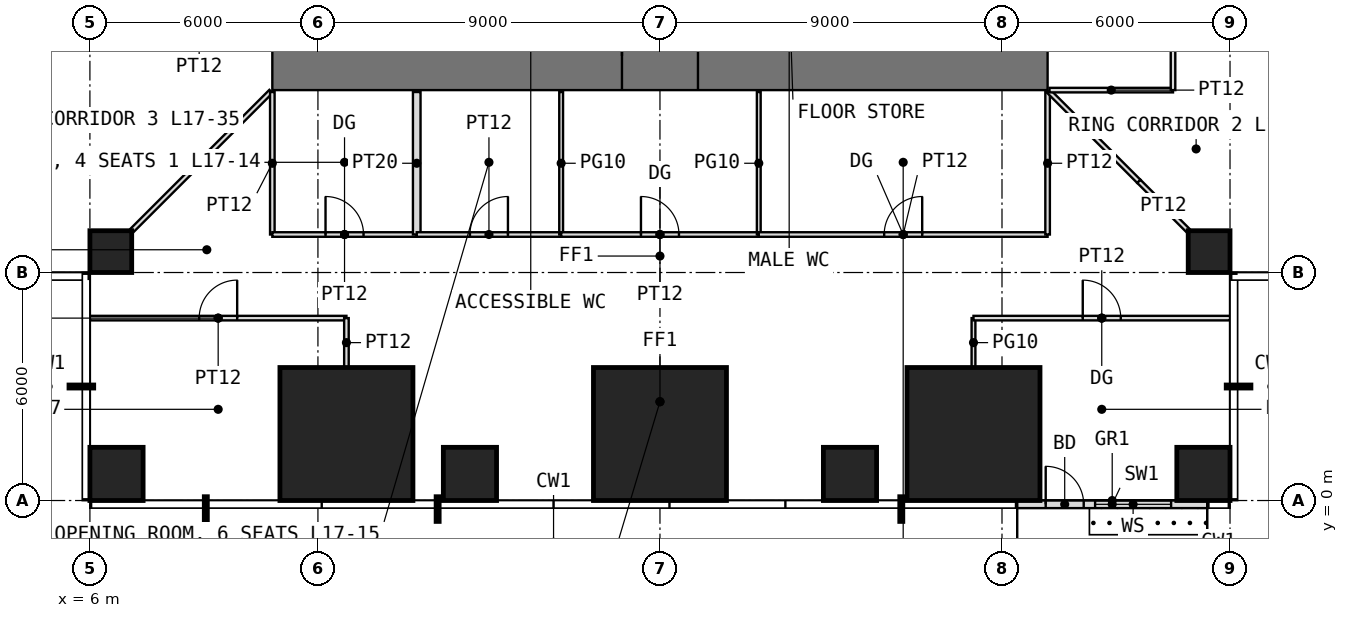
"""IFC4 building model, lengths in metres.
Left out: names, types, materials, properties, quantities, classifications, styles, units other than length and angle.
Written with IfcOpenShell. Run it as: python <this file> out.ifc"""

import sys

from ifc_helpers import new_model, si_unit, direction, frame, frame_2d, origin, origin_2d, place, context, subcontext, project, spatial, rectangle, extrude, element, fill, save


model = new_model("IFC4")
c1 = context("Model", 3, precision=1e-05, world=origin(), true_north=direction((0.0, 1.0)))
c2 = subcontext(c1, "Body", "Model", "MODEL_VIEW")
j1 = project(units=[si_unit("LENGTHUNIT", "METRE"), si_unit("PLANEANGLEUNIT", "RADIAN")], contexts=[c1])
p1 = place(None, origin())
s1 = spatial("IfcSite", under=j1, at=p1, CompositionType="ELEMENT")
p2 = place(p1, origin())
s2 = spatial("IfcBuilding", under=s1, at=p2, CompositionType="ELEMENT")
p3 = place(p2, frame((0.0, 0.0, 74.5)))
s3 = spatial("IfcBuildingStorey", under=s2, at=p3, CompositionType="ELEMENT", Elevation=74.5)
p4 = place(p3, frame((6.7, 0.7, 0.0), z_axis=(0.0, 0.0, 1.0), x_axis=(1.0, 0.0, 0.0)))
e1 = element("IfcColumn", 1, at=p4, inside=s3, PredefinedType="COLUMN", context=c2, shape_type="SweptSolid", body=[
    extrude(rectangle(XDim=1.4, YDim=1.4, at=origin_2d()), origin(), (0.0, 0.0, 1.0), 4.0),
])
p5 = place(p3, frame((12.75, 1.75, 0.0), z_axis=(0.0, 0.0, 1.0), x_axis=(1.0, 0.0, 0.0)))
e2 = element("IfcColumn", 2, at=p5, inside=s3, PredefinedType="COLUMN", context=c2, shape_type="SweptSolid", body=[
    extrude(rectangle(XDim=3.5, YDim=3.5, at=origin_2d()), origin(), (0.0, 0.0, 1.0), 4.0),
])
p6 = place(p3, frame((16.0, 0.7, 0.0), z_axis=(0.0, 0.0, 1.0), x_axis=(1.0, 0.0, 0.0)))
e3 = element("IfcColumn", 3, at=p6, inside=s3, PredefinedType="COLUMN", context=c2, shape_type="SweptSolid", body=[
    extrude(rectangle(XDim=1.4, YDim=1.4, at=origin_2d()), origin(), (0.0, 0.0, 1.0), 4.0),
])
p7 = place(p3, frame((21.0, 1.75, 0.0), z_axis=(0.0, 0.0, 1.0), x_axis=(1.0, 0.0, 0.0)))
e4 = element("IfcColumn", 4, at=p7, inside=s3, PredefinedType="COLUMN", context=c2, shape_type="SweptSolid", body=[
    extrude(rectangle(XDim=3.5, YDim=3.5, at=origin_2d()), origin(), (0.0, 0.0, 1.0), 4.0),
])
p8 = place(p3, frame((26.0, 0.7, 0.0), z_axis=(0.0, 0.0, 1.0), x_axis=(1.0, 0.0, 0.0)))
e5 = element("IfcColumn", 5, at=p8, inside=s3, PredefinedType="COLUMN", context=c2, shape_type="SweptSolid", body=[
    extrude(rectangle(XDim=1.4, YDim=1.4, at=origin_2d()), origin(), (0.0, 0.0, 1.0), 4.0),
])
p9 = place(p3, frame((29.25, 1.75, 0.0), z_axis=(0.0, 0.0, 1.0), x_axis=(1.0, 0.0, 0.0)))
e6 = element("IfcColumn", 6, at=p9, inside=s3, PredefinedType="COLUMN", context=c2, shape_type="SweptSolid", body=[
    extrude(rectangle(XDim=3.5, YDim=3.5, at=origin_2d()), origin(), (0.0, 0.0, 1.0), 4.0),
])
p10 = place(p3, frame((35.3, 0.7, 0.0), z_axis=(0.0, 0.0, 1.0), x_axis=(1.0, 0.0, 0.0)))
e7 = element("IfcColumn", 7, at=p10, inside=s3, PredefinedType="COLUMN", context=c2, shape_type="SweptSolid", body=[
    extrude(rectangle(XDim=1.4, YDim=1.4, at=origin_2d()), origin(), (0.0, 0.0, 1.0), 4.0),
])
for number, where, z_axis, x_axis in (
    (8, (6.55, 6.55, 0.0), (0.0, 0.0, 1.0), (1.0, 0.0, 0.0)),
    (9, (35.45, 6.55, 0.0), (0.0, 0.0, 1.0), (1.0, 0.0, 0.0)),
):
    element("IfcColumn", number, at=place(p3, frame(where, z_axis=z_axis, x_axis=x_axis)), inside=s3, PredefinedType="COLUMN", context=c2, shape_type="SweptSolid", body=[
        extrude(rectangle(XDim=1.1, YDim=1.1, at=origin_2d()), origin(), (0.0, 0.0, 1.0), 4.0),
    ])
p11 = place(p3, frame((30.4, -0.1, 0.0), z_axis=(0.0, 0.0, 1.0), x_axis=(1.0, 0.0, 0.0)))
e10 = element("IfcWall", 10, at=p11, inside=s3, PredefinedType="USERDEFINED", context=c2, shape_type="SweptSolid", body=[
    extrude(rectangle(XDim=5.0, YDim=0.2, at=frame_2d((2.5, 0.0))), origin(), (0.0, 0.0, 1.0), 3.75),
])
p12 = place(p11, frame((0.75, 0.0, 0.0)))
e11 = element("IfcOpeningElement", 11, at=p12, cuts=e10, PredefinedType="OPENING", context=c2, shape_type="SweptSolid", body=[
    extrude(rectangle(XDim=1.0, YDim=2.4, at=frame_2d((0.5, 1.2))), frame((0.0, 0.11, 0.0), z_axis=(0.0, -1.0, 0.0), x_axis=(1.0, 0.0, 0.0)), (0.0, 0.0, 1.0), 0.22),
])
p13 = place(p11, frame((2.05, 0.0, 0.3)))
e12 = element("IfcOpeningElement", 12, at=p13, cuts=e10, PredefinedType="OPENING", context=c2, shape_type="SweptSolid", body=[
    extrude(rectangle(XDim=2.0, YDim=2.7, at=frame_2d((1.0, 1.35))), frame((0.0, 0.11, 0.0), z_axis=(0.0, -1.0, 0.0), x_axis=(1.0, 0.0, 0.0)), (0.0, 0.0, 1.0), 0.22),
])
p14 = place(p3, frame((10.8, 11.7, -0.05), z_axis=(0.0, 0.0, 1.0), x_axis=(1.0, 0.0, 0.0)))
e13 = element("IfcWall", 13, at=p14, inside=s3, PredefinedType="SHEAR", context=c2, shape_type="SweptSolid", body=[
    extrude(rectangle(XDim=20.4, YDim=1.8, at=frame_2d((10.2, 0.0))), origin(), (0.0, 0.0, 1.0), 4.0),
])
p15 = place(p14, frame((9.2, 0.0, 0.05)))
e14 = element("IfcOpeningElement", 14, at=p15, cuts=e13, PredefinedType="OPENING", context=c2, shape_type="SweptSolid", body=[
    extrude(rectangle(XDim=2.0, YDim=2.2, at=frame_2d((1.0, 1.1))), frame((0.0, 0.91, 0.0), z_axis=(0.0, -1.0, 0.0), x_axis=(1.0, 0.0, 0.0)), (0.0, 0.0, 1.0), 1.82),
])
p16 = place(p3, frame((6.0, 4.8, 0.0), z_axis=(0.0, 0.0, 1.0), x_axis=(1.0, 0.0, 0.0)))
e15 = element("IfcWall", 15, at=p16, inside=s3, PredefinedType="PARTITIONING", context=c2, shape_type="SweptSolid", body=[
    extrude(rectangle(XDim=6.75, YDim=0.12, at=frame_2d((3.375, 0.0))), origin(), (0.0, 0.0, 1.0), 3.75),
])
p17 = place(p16, frame((2.875, 0.0, 0.0)))
e16 = element("IfcOpeningElement", 16, at=p17, cuts=e15, PredefinedType="OPENING", context=c2, shape_type="SweptSolid", body=[
    extrude(rectangle(XDim=1.0, YDim=2.2, at=frame_2d((0.5, 1.1))), frame((0.0, 0.07, 0.0), z_axis=(0.0, -1.0, 0.0), x_axis=(1.0, 0.0, 0.0)), (0.0, 0.0, 1.0), 0.14),
])
p18 = place(p3, frame((7.11, 7.11, 0.0), z_axis=(0.0, 0.0, 1.0), x_axis=(0.707106781187, 0.707106781187, 0.0)))
e17 = element("IfcWall", 17, at=p18, inside=s3, PredefinedType="PARTITIONING", context=c2, shape_type="SweptSolid", body=[
    extrude(rectangle(XDim=5.168, YDim=0.12, at=frame_2d((2.584, 0.0))), origin(), (0.0, 0.0, 1.0), 3.75),
])
p19 = place(p3, frame((10.8, 7.0, 0.0), z_axis=(0.0, 0.0, 1.0), x_axis=(0.0, 1.0, 0.0)))
e18 = element("IfcWall", 18, at=p19, inside=s3, PredefinedType="PARTITIONING", context=c2, shape_type="SweptSolid", body=[
    extrude(rectangle(XDim=3.75, YDim=0.12, at=frame_2d((1.875, 0.0))), origin(), (0.0, 0.0, 1.0), 3.75),
])
p20 = place(p3, frame((10.8, 7.0, 0.0), z_axis=(0.0, 0.0, 1.0), x_axis=(1.0, 0.0, 0.0)))
e19 = element("IfcWall", 19, at=p20, inside=s3, PredefinedType="PARTITIONING", context=c2, shape_type="SweptSolid", body=[
    extrude(rectangle(XDim=3.8, YDim=0.12, at=frame_2d((1.9, 0.0))), origin(), (0.0, 0.0, 1.0), 3.75),
])
p21 = place(p20, frame((1.4, 0.0, 0.0)))
e20 = element("IfcOpeningElement", 20, at=p21, cuts=e19, PredefinedType="OPENING", context=c2, shape_type="SweptSolid", body=[
    extrude(rectangle(XDim=1.0, YDim=2.4, at=frame_2d((0.5, 1.2))), frame((0.0, 0.07, 0.0), z_axis=(0.0, -1.0, 0.0), x_axis=(1.0, 0.0, 0.0)), (0.0, 0.0, 1.0), 0.14),
])
p22 = place(p3, frame((12.75, 3.51, 0.0), z_axis=(0.0, 0.0, 1.0), x_axis=(0.0, 1.0, 0.0)))
e21 = element("IfcWall", 21, at=p22, inside=s3, PredefinedType="PARTITIONING", context=c2, shape_type="SweptSolid", body=[
    extrude(rectangle(XDim=1.29, YDim=0.12, at=frame_2d((0.645, 0.0))), origin(), (0.0, 0.0, 1.0), 3.75),
])
p23 = place(p3, frame((14.6, 7.0, 0.0), z_axis=(0.0, 0.0, 1.0), x_axis=(0.0, 1.0, 0.0)))
e22 = element("IfcWall", 22, at=p23, inside=s3, PredefinedType="PARTITIONING", context=c2, shape_type="SweptSolid", body=[
    extrude(rectangle(XDim=3.75, YDim=0.2, at=frame_2d((1.875, 0.0))), origin(), (0.0, 0.0, 1.0), 3.75),
])
p24 = place(p3, frame((14.6, 7.0, 0.0), z_axis=(0.0, 0.0, 1.0), x_axis=(1.0, 0.0, 0.0)))
e23 = element("IfcWall", 23, at=p24, inside=s3, PredefinedType="PARTITIONING", context=c2, shape_type="SweptSolid", body=[
    extrude(rectangle(XDim=3.8, YDim=0.12, at=frame_2d((1.9, 0.0))), origin(), (0.0, 0.0, 1.0), 3.75),
])
p25 = place(p24, frame((1.4, 0.0, 0.0)))
e24 = element("IfcOpeningElement", 24, at=p25, cuts=e23, PredefinedType="OPENING", context=c2, shape_type="SweptSolid", body=[
    extrude(rectangle(XDim=1.0, YDim=2.4, at=frame_2d((0.5, 1.2))), frame((0.0, 0.07, 0.0), z_axis=(0.0, -1.0, 0.0), x_axis=(1.0, 0.0, 0.0)), (0.0, 0.0, 1.0), 0.14),
])
p26 = place(p3, frame((18.4, 7.0, 0.0), z_axis=(0.0, 0.0, 1.0), x_axis=(0.0, 1.0, 0.0)))
e25 = element("IfcWall", 25, at=p26, inside=s3, PredefinedType="PARTITIONING", context=c2, shape_type="SweptSolid", body=[
    extrude(rectangle(XDim=3.75, YDim=0.1, at=frame_2d((1.875, 0.0))), origin(), (0.0, 0.0, 1.0), 3.75),
])
p27 = place(p3, frame((18.4, 7.0, 0.0), z_axis=(0.0, 0.0, 1.0), x_axis=(1.0, 0.0, 0.0)))
e26 = element("IfcWall", 26, at=p27, inside=s3, PredefinedType="PARTITIONING", context=c2, shape_type="SweptSolid", body=[
    extrude(rectangle(XDim=5.2, YDim=0.12, at=frame_2d((2.6, 0.0))), origin(), (0.0, 0.0, 1.0), 3.75),
])
p28 = place(p27, frame((2.1, 0.0, 0.0)))
e27 = element("IfcOpeningElement", 27, at=p28, cuts=e26, PredefinedType="OPENING", context=c2, shape_type="SweptSolid", body=[
    extrude(rectangle(XDim=1.0, YDim=2.4, at=frame_2d((0.5, 1.2))), frame((0.0, 0.07, 0.0), z_axis=(0.0, -1.0, 0.0), x_axis=(1.0, 0.0, 0.0)), (0.0, 0.0, 1.0), 0.14),
])
p29 = place(p3, frame((23.6, 7.0, 0.0), z_axis=(0.0, 0.0, 1.0), x_axis=(0.0, 1.0, 0.0)))
e28 = element("IfcWall", 28, at=p29, inside=s3, PredefinedType="PARTITIONING", context=c2, shape_type="SweptSolid", body=[
    extrude(rectangle(XDim=3.75, YDim=0.1, at=frame_2d((1.875, 0.0))), origin(), (0.0, 0.0, 1.0), 3.75),
])
p30 = place(p3, frame((23.6, 7.0, 0.0), z_axis=(0.0, 0.0, 1.0), x_axis=(1.0, 0.0, 0.0)))
e29 = element("IfcWall", 29, at=p30, inside=s3, PredefinedType="PARTITIONING", context=c2, shape_type="SweptSolid", body=[
    extrude(rectangle(XDim=7.6, YDim=0.12, at=frame_2d((3.8, 0.0))), origin(), (0.0, 0.0, 1.0), 3.75),
])
p31 = place(p30, frame((3.3, 0.0, 0.0)))
e30 = element("IfcOpeningElement", 30, at=p31, cuts=e29, PredefinedType="OPENING", context=c2, shape_type="SweptSolid", body=[
    extrude(rectangle(XDim=1.0, YDim=2.4, at=frame_2d((0.5, 1.2))), frame((0.0, 0.07, 0.0), z_axis=(0.0, -1.0, 0.0), x_axis=(1.0, 0.0, 0.0)), (0.0, 0.0, 1.0), 0.14),
])
p32 = place(p3, frame((29.25, 3.51, 0.0), z_axis=(0.0, 0.0, 1.0), x_axis=(0.0, 1.0, 0.0)))
e31 = element("IfcWall", 31, at=p32, inside=s3, PredefinedType="PARTITIONING", context=c2, shape_type="SweptSolid", body=[
    extrude(rectangle(XDim=1.29, YDim=0.1, at=frame_2d((0.645, 0.0))), origin(), (0.0, 0.0, 1.0), 3.75),
])
p33 = place(p3, frame((29.25, 4.8, 0.0), z_axis=(0.0, 0.0, 1.0), x_axis=(1.0, 0.0, 0.0)))
e32 = element("IfcWall", 32, at=p33, inside=s3, PredefinedType="PARTITIONING", context=c2, shape_type="SweptSolid", body=[
    extrude(rectangle(XDim=6.75, YDim=0.12, at=frame_2d((3.375, 0.0))), origin(), (0.0, 0.0, 1.0), 3.75),
])
p34 = place(p33, frame((2.875, 0.0, 0.0)))
e33 = element("IfcOpeningElement", 33, at=p34, cuts=e32, PredefinedType="OPENING", context=c2, shape_type="SweptSolid", body=[
    extrude(rectangle(XDim=1.0, YDim=2.4, at=frame_2d((0.5, 1.2))), frame((0.0, 0.07, 0.0), z_axis=(0.0, -1.0, 0.0), x_axis=(1.0, 0.0, 0.0)), (0.0, 0.0, 1.0), 0.14),
])
p35 = place(p3, frame((31.2, 7.0, 0.0), z_axis=(0.0, 0.0, 1.0), x_axis=(0.0, 1.0, 0.0)))
e34 = element("IfcWall", 34, at=p35, inside=s3, PredefinedType="PARTITIONING", context=c2, shape_type="SweptSolid", body=[
    extrude(rectangle(XDim=3.75, YDim=0.12, at=frame_2d((1.875, 0.0))), origin(), (0.0, 0.0, 1.0), 3.75),
])
p36 = place(p3, frame((31.235, 10.765, 0.0), z_axis=(0.0, 0.0, 1.0), x_axis=(0.707106781187, -0.707106781187, 0.0)))
e35 = element("IfcWall", 35, at=p36, inside=s3, PredefinedType="PARTITIONING", context=c2, shape_type="SweptSolid", body=[
    extrude(rectangle(XDim=3.346, YDim=0.12, at=frame_2d((1.673, 0.0))), origin(), (0.0, 0.0, 1.0), 3.75),
])
p37 = place(p3, frame((31.25, 10.8, 0.0), z_axis=(0.0, 0.0, 1.0), x_axis=(1.0, 0.0, 0.0)))
e36 = element("IfcWall", 36, at=p37, inside=s3, PredefinedType="PARTITIONING", context=c2, shape_type="SweptSolid", body=[
    extrude(rectangle(XDim=3.25, YDim=0.12, at=frame_2d((1.625, 0.0))), origin(), (0.0, 0.0, 1.0), 3.75),
])
p38 = place(p3, frame((33.602, 8.398, 0.0), z_axis=(0.0, 0.0, 1.0), x_axis=(0.707106781187, -0.707106781187, 0.0)))
e37 = element("IfcWall", 37, at=p38, inside=s3, PredefinedType="PARTITIONING", context=c2, shape_type="SweptSolid", body=[
    extrude(rectangle(XDim=1.822, YDim=0.12, at=frame_2d((0.911, 0.0))), origin(), (0.0, 0.0, 1.0), 3.75),
])
p39 = place(p3, frame((34.5, 10.8, 0.0), z_axis=(0.0, 0.0, 1.0), x_axis=(0.0, 1.0, 0.0)))
e38 = element("IfcWall", 38, at=p39, inside=s3, PredefinedType="PARTITIONING", context=c2, shape_type="SweptSolid", body=[
    extrude(rectangle(XDim=3.8, YDim=0.12, at=frame_2d((1.9, 0.0))), origin(), (0.0, 0.0, 1.0), 3.75),
])
p40 = place(p39, frame((1.4, 0.0, 0.0)))
e39 = element("IfcOpeningElement", 39, at=p40, cuts=e38, PredefinedType="OPENING", context=c2, shape_type="SweptSolid", body=[
    extrude(rectangle(XDim=1.0, YDim=2.2, at=frame_2d((0.5, 1.1))), frame((0.0, 0.07, 0.0), z_axis=(0.0, -1.0, 0.0), x_axis=(1.0, 0.0, 0.0)), (0.0, 0.0, 1.0), 0.14),
])
p41 = place(p12, origin())
e40 = element("IfcDoor", 40, at=p41, inside=s3, OperationType="SINGLE_SWING_LEFT", PredefinedType="DOOR", context=c2, shape_type="SweptSolid", body=[
    extrude(rectangle(XDim=1.0, YDim=2.4, at=frame_2d((0.5, 1.2))), frame((0.0, 0.025, 0.0), z_axis=(0.0, -1.0, 0.0), x_axis=(1.0, 0.0, 0.0)), (0.0, 0.0, 1.0), 0.05),
])
fill(e11, e40)
p42 = place(p13, origin())
e41 = element("IfcWindow", 41, at=p42, inside=s3, PartitioningType="SINGLE_PANEL", PredefinedType="WINDOW", context=c2, shape_type="SweptSolid", body=[
    extrude(rectangle(XDim=2.0, YDim=2.7, at=frame_2d((1.0, 1.35))), frame((0.0, 0.03, 0.0), z_axis=(0.0, -1.0, 0.0), x_axis=(1.0, 0.0, 0.0)), (0.0, 0.0, 1.0), 0.06),
])
fill(e12, e41)
p43 = place(p15, origin())
e42 = element("IfcDoor", 42, at=p43, inside=s3, OperationType="DOUBLE_DOOR_SINGLE_SWING", PredefinedType="DOOR", context=c2, shape_type="SweptSolid", body=[
    extrude(rectangle(XDim=2.0, YDim=2.2, at=frame_2d((1.0, 1.1))), frame((0.0, 0.025, 0.0), z_axis=(0.0, -1.0, 0.0), x_axis=(1.0, 0.0, 0.0)), (0.0, 0.0, 1.0), 0.05),
])
fill(e14, e42)
p44 = place(p21, origin())
e43 = element("IfcDoor", 43, at=p44, inside=s3, OperationType="SINGLE_SWING_LEFT", PredefinedType="DOOR", context=c2, shape_type="SweptSolid", body=[
    extrude(rectangle(XDim=1.0, YDim=2.4, at=frame_2d((0.5, 1.2))), frame((0.0, 0.025, 0.0), z_axis=(0.0, -1.0, 0.0), x_axis=(1.0, 0.0, 0.0)), (0.0, 0.0, 1.0), 0.05),
])
fill(e20, e43)
p45 = place(p25, origin())
e44 = element("IfcDoor", 44, at=p45, inside=s3, OperationType="SINGLE_SWING_RIGHT", PredefinedType="DOOR", context=c2, shape_type="SweptSolid", body=[
    extrude(rectangle(XDim=1.0, YDim=2.4, at=frame_2d((0.5, 1.2))), frame((0.0, 0.025, 0.0), z_axis=(0.0, -1.0, 0.0), x_axis=(1.0, 0.0, 0.0)), (0.0, 0.0, 1.0), 0.05),
])
fill(e24, e44)
p46 = place(p31, origin())
e45 = element("IfcDoor", 45, at=p46, inside=s3, OperationType="SINGLE_SWING_RIGHT", PredefinedType="DOOR", context=c2, shape_type="SweptSolid", body=[
    extrude(rectangle(XDim=1.0, YDim=2.4, at=frame_2d((0.5, 1.2))), frame((0.0, 0.025, 0.0), z_axis=(0.0, -1.0, 0.0), x_axis=(1.0, 0.0, 0.0)), (0.0, 0.0, 1.0), 0.05),
])
fill(e30, e45)
p47 = place(p17, origin())
e46 = element("IfcDoor", 46, at=p47, inside=s3, OperationType="SINGLE_SWING_RIGHT", PredefinedType="DOOR", context=c2, shape_type="SweptSolid", body=[
    extrude(rectangle(XDim=1.0, YDim=2.2, at=frame_2d((0.5, 1.1))), frame((0.0, 0.025, 0.0), z_axis=(0.0, -1.0, 0.0), x_axis=(1.0, 0.0, 0.0)), (0.0, 0.0, 1.0), 0.05),
])
fill(e16, e46)
p48 = place(p34, origin())
e47 = element("IfcDoor", 47, at=p48, inside=s3, OperationType="SINGLE_SWING_LEFT", PredefinedType="DOOR", context=c2, shape_type="SweptSolid", body=[
    extrude(rectangle(XDim=1.0, YDim=2.4, at=frame_2d((0.5, 1.2))), frame((0.0, 0.025, 0.0), z_axis=(0.0, -1.0, 0.0), x_axis=(1.0, 0.0, 0.0)), (0.0, 0.0, 1.0), 0.05),
])
fill(e33, e47)
p49 = place(p28, origin())
e48 = element("IfcDoor", 48, at=p49, inside=s3, OperationType="SINGLE_SWING_LEFT", PredefinedType="DOOR", context=c2, shape_type="SweptSolid", body=[
    extrude(rectangle(XDim=1.0, YDim=2.4, at=frame_2d((0.5, 1.2))), frame((0.0, 0.025, 0.0), z_axis=(0.0, -1.0, 0.0), x_axis=(1.0, 0.0, 0.0)), (0.0, 0.0, 1.0), 0.05),
])
fill(e27, e48)
save(model, sys.argv[1])
